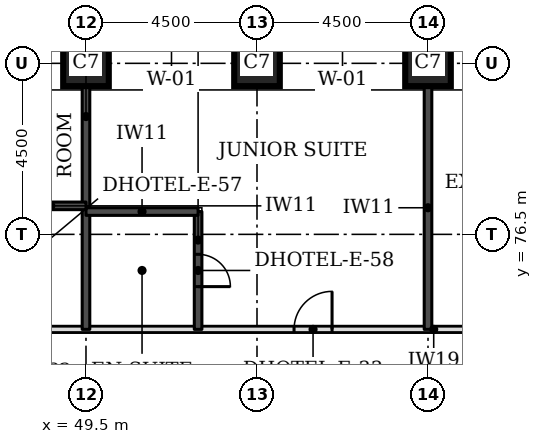
"""IFC4 building model, lengths in metres.
Left out: names, types, materials, properties, quantities, classifications, styles, units other than length and angle.
Written with IfcOpenShell. Run it as: python <this file> out.ifc"""

import sys

from ifc_helpers import new_model, si_unit, direction, frame, frame_2d, origin, origin_2d, place, context, subcontext, project, spatial, rectangle, extrude, element, fill, save


model = new_model("IFC4")
c1 = context("Model", 3, precision=1e-05, world=origin(), true_north=direction((0.0, 1.0)))
c2 = subcontext(c1, "Body", "Model", "MODEL_VIEW")
j1 = project(units=[si_unit("LENGTHUNIT", "METRE"), si_unit("PLANEANGLEUNIT", "RADIAN")], contexts=[c1])
p1 = place(None, origin())
s1 = spatial("IfcSite", under=j1, at=p1, CompositionType="ELEMENT")
p2 = place(p1, origin())
s2 = spatial("IfcBuilding", under=s1, at=p2, CompositionType="ELEMENT")
p3 = place(p2, frame((0.0, 0.0, 62.7)))
s3 = spatial("IfcBuildingStorey", under=s2, at=p3, CompositionType="ELEMENT", Elevation=62.7)
for number, where, z_axis, x_axis in (
    (1, (49.5, 81.0, 0.0), (0.0, 0.0, 1.0), (1.0, 0.0, 0.0)),
    (2, (54.0, 81.0, 0.0), (0.0, 0.0, 1.0), (1.0, 0.0, 0.0)),
    (3, (58.5, 81.0, 0.0), (0.0, 0.0, 1.0), (1.0, 0.0, 0.0)),
):
    element("IfcColumn", number, at=place(p3, frame(where, z_axis=z_axis, x_axis=x_axis)), inside=s3, PredefinedType="COLUMN", context=c2, shape_type="SweptSolid", body=[
        extrude(rectangle(XDim=1.2, YDim=1.2, at=origin_2d()), origin(), (0.0, 0.0, 1.0), 3.3),
    ])
p4 = place(p3, frame((43.0, 74.0, 0.0), z_axis=(0.0, 0.0, 1.0), x_axis=(1.0, 0.0, 0.0)))
e4 = element("IfcWall", 4, at=p4, inside=s3, PredefinedType="PARTITIONING", context=c2, shape_type="SweptSolid", body=[
    extrude(rectangle(XDim=26.5, YDim=0.15, at=frame_2d((13.25, 0.0))), origin(), (0.0, 0.0, 1.0), 3.08),
])
p5 = place(p4, frame((2.825, 0.0, 0.0)))
e5 = element("IfcOpeningElement", 5, at=p5, cuts=e4, PredefinedType="OPENING", context=c2, shape_type="SweptSolid", body=[
    extrude(rectangle(XDim=1.0, YDim=2.1, at=frame_2d((0.5, 1.05))), frame((0.0, 0.085, 0.0), z_axis=(0.0, -1.0, 0.0), x_axis=(1.0, 0.0, 0.0)), (0.0, 0.0, 1.0), 0.17),
])
p6 = place(p4, frame((11.975, 0.0, 0.0)))
e6 = element("IfcOpeningElement", 6, at=p6, cuts=e4, PredefinedType="OPENING", context=c2, shape_type="SweptSolid", body=[
    extrude(rectangle(XDim=1.0, YDim=2.1, at=frame_2d((0.5, 1.05))), frame((0.0, 0.085, 0.0), z_axis=(0.0, -1.0, 0.0), x_axis=(1.0, 0.0, 0.0)), (0.0, 0.0, 1.0), 0.17),
])
p7 = place(p4, frame((18.275, 0.0, 0.0)))
e7 = element("IfcOpeningElement", 7, at=p7, cuts=e4, PredefinedType="OPENING", context=c2, shape_type="SweptSolid", body=[
    extrude(rectangle(XDim=1.0, YDim=2.1, at=frame_2d((0.5, 1.05))), frame((0.0, 0.085, 0.0), z_axis=(0.0, -1.0, 0.0), x_axis=(1.0, 0.0, 0.0)), (0.0, 0.0, 1.0), 0.17),
])
p8 = place(p4, frame((0.5, 0.0, 0.0)))
e8 = element("IfcOpeningElement", 8, at=p8, cuts=e4, PredefinedType="OPENING", context=c2, shape_type="SweptSolid", body=[
    extrude(rectangle(XDim=1.0, YDim=2.1, at=frame_2d((0.5, 1.05))), frame((0.0, 0.085, 0.0), z_axis=(0.0, -1.0, 0.0), x_axis=(1.0, 0.0, 0.0)), (0.0, 0.0, 1.0), 0.17),
])
p9 = place(p4, frame((25.0, 0.0, 0.0)))
e9 = element("IfcOpeningElement", 9, at=p9, cuts=e4, PredefinedType="OPENING", context=c2, shape_type="SweptSolid", body=[
    extrude(rectangle(XDim=1.0, YDim=2.1, at=frame_2d((0.5, 1.05))), frame((0.0, 0.085, 0.0), z_axis=(0.0, -1.0, 0.0), x_axis=(1.0, 0.0, 0.0)), (0.0, 0.0, 1.0), 0.17),
])
p10 = place(p3, frame((49.5, 74.0, 0.0), z_axis=(0.0, 0.0, 1.0), x_axis=(0.0, 1.0, 0.0)))
e10 = element("IfcWall", 10, at=p10, inside=s3, PredefinedType="SOLIDWALL", context=c2, shape_type="SweptSolid", body=[
    extrude(rectangle(XDim=6.4, YDim=0.2, at=frame_2d((3.2, 0.0))), origin(), (0.0, 0.0, 1.0), 3.08),
])
p11 = place(p3, frame((52.45, 74.0, 0.0), z_axis=(0.0, 0.0, 1.0), x_axis=(0.0, 1.0, 0.0)))
e11 = element("IfcWall", 11, at=p11, inside=s3, PredefinedType="SOLIDWALL", context=c2, shape_type="SweptSolid", body=[
    extrude(rectangle(XDim=3.1, YDim=0.2, at=frame_2d((1.55, 0.0))), origin(), (0.0, 0.0, 1.0), 3.08),
])
p12 = place(p11, frame((1.125, 0.0, 0.0)))
e12 = element("IfcOpeningElement", 12, at=p12, cuts=e11, PredefinedType="OPENING", context=c2, shape_type="SweptSolid", body=[
    extrude(rectangle(XDim=0.85, YDim=2.1, at=frame_2d((0.425, 1.05))), frame((0.0, 0.11, 0.0), z_axis=(0.0, -1.0, 0.0), x_axis=(1.0, 0.0, 0.0)), (0.0, 0.0, 1.0), 0.22),
])
p13 = place(p3, frame((58.5, 74.0, 0.0), z_axis=(0.0, 0.0, 1.0), x_axis=(0.0, 1.0, 0.0)))
e13 = element("IfcWall", 13, at=p13, inside=s3, PredefinedType="SOLIDWALL", context=c2, shape_type="SweptSolid", body=[
    extrude(rectangle(XDim=6.4, YDim=0.2, at=frame_2d((3.2, 0.0))), origin(), (0.0, 0.0, 1.0), 3.08),
])
p14 = place(p3, frame((49.5, 77.1, 0.0), z_axis=(0.0, 0.0, 1.0), x_axis=(1.0, 0.0, 0.0)))
e14 = element("IfcWall", 14, at=p14, inside=s3, PredefinedType="SOLIDWALL", context=c2, shape_type="SweptSolid", body=[
    extrude(rectangle(XDim=2.95, YDim=0.2, at=frame_2d((1.475, 0.0))), origin(), (0.0, 0.0, 1.0), 3.08),
])
p15 = place(p3, frame((47.65, 77.25, 0.0), z_axis=(0.0, 0.0, 1.0), x_axis=(1.0, 0.0, 0.0)))
e15 = element("IfcWall", 15, at=p15, inside=s3, PredefinedType="SOLIDWALL", context=c2, shape_type="SweptSolid", body=[
    extrude(rectangle(XDim=1.85, YDim=0.2, at=frame_2d((0.925, 0.0))), origin(), (0.0, 0.0, 1.0), 3.08),
])
p16 = place(p6, origin())
e16 = element("IfcDoor", 16, at=p16, inside=s3, OperationType="SINGLE_SWING_RIGHT", PredefinedType="DOOR", context=c2, shape_type="SweptSolid", body=[
    extrude(rectangle(XDim=1.0, YDim=2.1, at=frame_2d((0.5, 1.05))), frame((0.0, 0.025, 0.0), z_axis=(0.0, -1.0, 0.0), x_axis=(1.0, 0.0, 0.0)), (0.0, 0.0, 1.0), 0.05),
])
fill(e6, e16)
p17 = place(p12, frame((0.85, 0.0, 0.0), z_axis=(0.0, 0.0, 1.0), x_axis=(-1.0, 0.0, 0.0)))
e17 = element("IfcDoor", 17, at=p17, inside=s3, OperationType="SINGLE_SWING_RIGHT", PredefinedType="DOOR", context=c2, shape_type="SweptSolid", body=[
    extrude(rectangle(XDim=0.85, YDim=2.1, at=frame_2d((0.425, 1.05))), frame((0.0, 0.025, 0.0), z_axis=(0.0, -1.0, 0.0), x_axis=(1.0, 0.0, 0.0)), (0.0, 0.0, 1.0), 0.05),
])
fill(e12, e17)
save(model, sys.argv[1])
